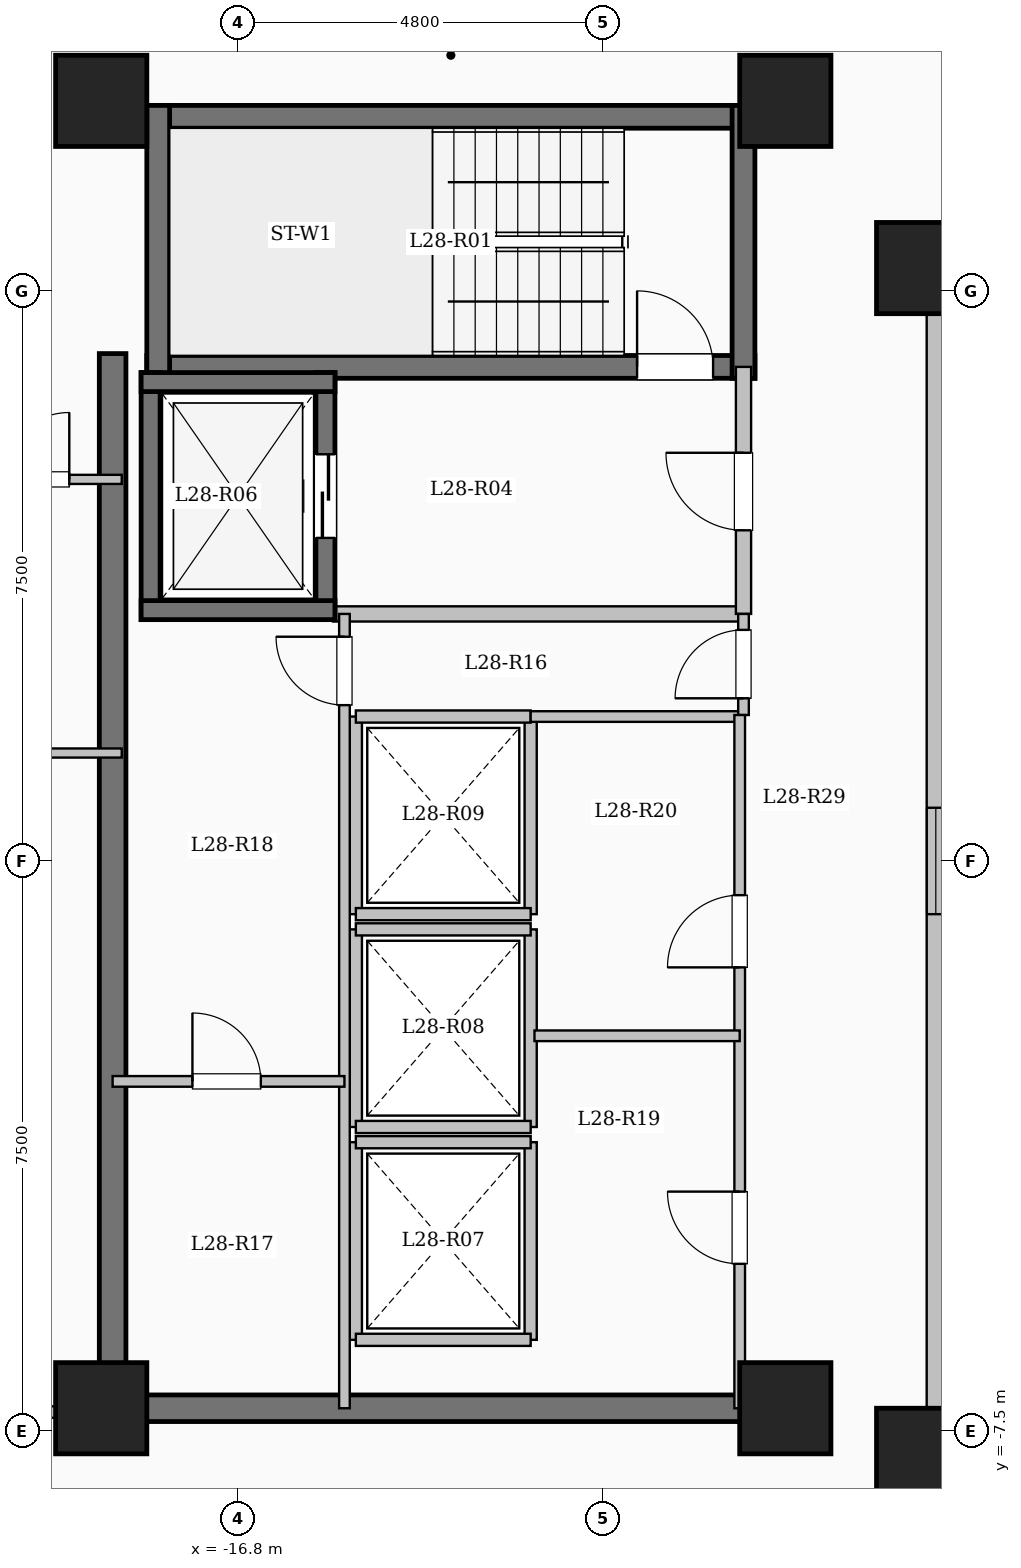
"""IFC4 building model, lengths in metres.
Left out: names, types, materials, properties, quantities, classifications, styles, units other than length and angle.
Written with IfcOpenShell. Run it as: python <this file> out.ifc"""

import sys

from ifc_helpers import new_model, si_unit, direction, frame, frame_2d, origin, origin_2d, place, context, subcontext, project, spatial, rectangle, extrude, element, fill, save


model = new_model("IFC4")
c1 = context("Model", 3, precision=1e-05, world=origin(), true_north=direction((0.0, 1.0)))
c2 = subcontext(c1, "Body", "Model", "MODEL_VIEW")
j1 = project(units=[si_unit("LENGTHUNIT", "METRE"), si_unit("PLANEANGLEUNIT", "RADIAN")], contexts=[c1])
p1 = place(None, origin())
s1 = spatial("IfcSite", under=j1, at=p1, CompositionType="ELEMENT")
p2 = place(p1, origin())
s2 = spatial("IfcBuilding", under=s1, at=p2, CompositionType="ELEMENT")
p3 = place(p2, frame((0.0, 0.0, 105.1)))
s3 = spatial("IfcBuildingStorey", under=s2, at=p3, CompositionType="ELEMENT", Elevation=105.1)
for number, where, z_axis, x_axis in (
    (1, (-7.8, -7.8, 0.0), (0.0, 0.0, 1.0), (1.0, 0.0, 0.0)),
    (2, (-7.8, 7.8, 0.0), (0.0, 0.0, 1.0), (1.0, 0.0, 0.0)),
    (3, (-9.6, -7.2, 0.0), (0.0, 0.0, 1.0), (1.0, 0.0, 0.0)),
    (4, (-9.6, 10.0, 0.0), (0.0, 0.0, 1.0), (1.0, 0.0, 0.0)),
    (5, (-18.6, -7.2, 0.0), (0.0, 0.0, 1.0), (1.0, 0.0, 0.0)),
    (6, (-18.6, 10.0, 0.0), (0.0, 0.0, 1.0), (1.0, 0.0, 0.0)),
):
    element("IfcColumn", number, at=place(p3, frame(where, z_axis=z_axis, x_axis=x_axis)), inside=s3, PredefinedType="COLUMN", context=c2, shape_type="SweptSolid", body=[
        extrude(rectangle(XDim=1.2, YDim=1.2, at=origin_2d()), origin(), (0.0, 0.0, 1.0), 3.35),
    ])
p4 = place(p3, frame((-7.62, -7.62, 0.0), z_axis=(0.0, 0.0, 1.0), x_axis=(1.0, 0.0, 0.0)))
e7 = element("IfcWall", 7, at=p4, inside=s3, PredefinedType="SOLIDWALL", context=c2, shape_type="SweptSolid", body=[
    extrude(rectangle(XDim=15.24, YDim=0.24, at=frame_2d((7.62, 0.0))), origin(), (0.0, 0.0, 1.0), 3.1),
])
p5 = place(p4, frame((6.92, 0.0, 0.95)))
e8 = element("IfcOpeningElement", 8, at=p5, cuts=e7, PredefinedType="OPENING", context=c2, shape_type="SweptSolid", body=[
    extrude(rectangle(XDim=1.4, YDim=1.5, at=frame_2d((0.7, 0.75))), frame((0.0, 0.13, 0.0), z_axis=(0.0, -1.0, 0.0), x_axis=(1.0, 0.0, 0.0)), (0.0, 0.0, 1.0), 0.26),
])
p6 = place(p3, frame((7.62, 7.62, 0.0), z_axis=(0.0, 0.0, 1.0), x_axis=(-1.0, 0.0, 0.0)))
e9 = element("IfcWall", 9, at=p6, inside=s3, PredefinedType="SOLIDWALL", context=c2, shape_type="SweptSolid", body=[
    extrude(rectangle(XDim=15.24, YDim=0.24, at=frame_2d((7.62, 0.0))), origin(), (0.0, 0.0, 1.0), 3.1),
])
p7 = place(p6, frame((6.92, 0.0, 0.95)))
e10 = element("IfcOpeningElement", 10, at=p7, cuts=e9, PredefinedType="OPENING", context=c2, shape_type="SweptSolid", body=[
    extrude(rectangle(XDim=1.4, YDim=1.5, at=frame_2d((0.7, 0.75))), frame((0.0, 0.13, 0.0), z_axis=(0.0, -1.0, 0.0), x_axis=(1.0, 0.0, 0.0)), (0.0, 0.0, 1.0), 0.26),
])
p8 = place(p3, frame((-7.62, 7.62, 0.0), z_axis=(0.0, 0.0, 1.0), x_axis=(0.0, -1.0, 0.0)))
e11 = element("IfcWall", 11, at=p8, inside=s3, PredefinedType="SOLIDWALL", context=c2, shape_type="SweptSolid", body=[
    extrude(rectangle(XDim=15.24, YDim=0.24, at=frame_2d((7.62, 0.0))), origin(), (0.0, 0.0, 1.0), 3.1),
])
p9 = place(p8, frame((6.92, 0.0, 0.95)))
e12 = element("IfcOpeningElement", 12, at=p9, cuts=e11, PredefinedType="OPENING", context=c2, shape_type="SweptSolid", body=[
    extrude(rectangle(XDim=1.4, YDim=1.5, at=frame_2d((0.7, 0.75))), frame((0.0, 0.13, 0.0), z_axis=(0.0, -1.0, 0.0), x_axis=(1.0, 0.0, 0.0)), (0.0, 0.0, 1.0), 0.26),
])
p10 = place(p3, frame((-18.0, 9.79, 0.0), z_axis=(0.0, 0.0, 1.0), x_axis=(1.0, 0.0, 0.0)))
e13 = element("IfcWall", 13, at=p10, inside=s3, PredefinedType="SHEAR", context=c2, shape_type="SweptSolid", body=[
    extrude(rectangle(XDim=8.0, YDim=0.3, at=frame_2d((4.0, 0.0))), origin(), (0.0, 0.0, 1.0), 3.35),
])
p11 = place(p3, frame((-18.0, 6.5, 0.0), z_axis=(0.0, 0.0, 1.0), x_axis=(1.0, 0.0, 0.0)))
e14 = element("IfcWall", 14, at=p11, inside=s3, PredefinedType="SHEAR", context=c2, shape_type="SweptSolid", body=[
    extrude(rectangle(XDim=8.0, YDim=0.3, at=frame_2d((4.0, 0.0))), origin(), (0.0, 0.0, 1.0), 3.35),
])
p12 = place(p11, frame((6.45, 0.0, 0.0)))
e15 = element("IfcOpeningElement", 15, at=p12, cuts=e14, PredefinedType="OPENING", context=c2, shape_type="SweptSolid", body=[
    extrude(rectangle(XDim=1.0, YDim=2.15, at=frame_2d((0.5, 1.075))), frame((0.0, 0.16, 0.0), z_axis=(0.0, -1.0, 0.0), x_axis=(1.0, 0.0, 0.0)), (0.0, 0.0, 1.0), 0.32),
])
for number, where, z_axis, x_axis in (
    (16, (-17.85, 6.35, 0.0), (0.0, 0.0, 1.0), (0.0, 1.0, 0.0)),
    (17, (-10.15, 6.35, 0.0), (0.0, 0.0, 1.0), (0.0, 1.0, 0.0)),
):
    element("IfcWall", number, at=place(p3, frame(where, z_axis=z_axis, x_axis=x_axis)), inside=s3, PredefinedType="SHEAR", context=c2, shape_type="SweptSolid", body=[
        extrude(rectangle(XDim=3.59, YDim=0.3, at=frame_2d((1.795, 0.0))), origin(), (0.0, 0.0, 1.0), 3.35),
    ])
p13 = place(p3, frame((-15.55, 3.25, 0.0), z_axis=(0.0, 0.0, 1.0), x_axis=(1.0, 0.0, 0.0)))
e18 = element("IfcWall", 18, at=p13, inside=s3, PredefinedType="SOLIDWALL", context=c2, shape_type="SweptSolid", body=[
    extrude(rectangle(XDim=5.4, YDim=0.2, at=frame_2d((2.7, 0.0))), origin(), (0.0, 0.0, 1.0), 3.1),
])
p14 = place(p3, frame((-10.15, 3.25, 0.0), z_axis=(0.0, 0.0, 1.0), x_axis=(0.0, 1.0, 0.0)))
e19 = element("IfcWall", 19, at=p14, inside=s3, PredefinedType="SOLIDWALL", context=c2, shape_type="SweptSolid", body=[
    extrude(rectangle(XDim=3.25, YDim=0.2, at=frame_2d((1.625, 0.0))), origin(), (0.0, 0.0, 1.0), 3.1),
])
p15 = place(p14, frame((1.1, 0.0, 0.0)))
e20 = element("IfcOpeningElement", 20, at=p15, cuts=e19, PredefinedType="OPENING", context=c2, shape_type="SweptSolid", body=[
    extrude(rectangle(XDim=1.02, YDim=2.15, at=frame_2d((0.51, 1.075))), frame((0.0, 0.11, 0.0), z_axis=(0.0, -1.0, 0.0), x_axis=(1.0, 0.0, 0.0)), (0.0, 0.0, 1.0), 0.22),
])
p16 = place(p3, frame((-17.95, 3.175, 0.0), z_axis=(0.0, 0.0, 1.0), x_axis=(0.0, 1.0, 0.0)))
e21 = element("IfcWall", 21, at=p16, inside=s3, PredefinedType="SHEAR", context=c2, shape_type="SweptSolid", body=[
    extrude(rectangle(XDim=3.25, YDim=0.25, at=frame_2d((1.625, 0.0))), origin(), (0.0, 0.0, 1.0), 3.35),
])
p17 = place(p3, frame((-15.65, 3.175, 0.0), z_axis=(0.0, 0.0, 1.0), x_axis=(0.0, 1.0, 0.0)))
e22 = element("IfcWall", 22, at=p17, inside=s3, PredefinedType="SHEAR", context=c2, shape_type="SweptSolid", body=[
    extrude(rectangle(XDim=3.25, YDim=0.25, at=frame_2d((1.625, 0.0))), origin(), (0.0, 0.0, 1.0), 3.35),
])
p18 = place(p17, frame((1.075, 0.0, 0.0)))
e23 = element("IfcOpeningElement", 23, at=p18, cuts=e22, PredefinedType="OPENING", context=c2, shape_type="SweptSolid", body=[
    extrude(rectangle(XDim=1.1, YDim=2.15, at=frame_2d((0.55, 1.075))), frame((0.0, 0.135, 0.0), z_axis=(0.0, -1.0, 0.0), x_axis=(1.0, 0.0, 0.0)), (0.0, 0.0, 1.0), 0.27),
])
for number, where, z_axis, x_axis in (
    (24, (-18.075, 3.3, 0.0), (0.0, 0.0, 1.0), (1.0, 0.0, 0.0)),
    (25, (-18.075, 6.3, 0.0), (0.0, 0.0, 1.0), (1.0, 0.0, 0.0)),
):
    element("IfcWall", number, at=place(p3, frame(where, z_axis=z_axis, x_axis=x_axis)), inside=s3, PredefinedType="SHEAR", context=c2, shape_type="SweptSolid", body=[
        extrude(rectangle(XDim=2.55, YDim=0.25, at=frame_2d((1.275, 0.0))), origin(), (0.0, 0.0, 1.0), 3.35),
    ])
for number, where, z_axis, x_axis in (
    (26, (-15.25, -6.3, 0.0), (0.0, 0.0, 1.0), (0.0, 1.0, 0.0)),
    (27, (-12.95, -6.3, 0.0), (0.0, 0.0, 1.0), (0.0, 1.0, 0.0)),
):
    element("IfcWall", number, at=place(p3, frame(where, z_axis=z_axis, x_axis=x_axis)), inside=s3, PredefinedType="SOLIDWALL", context=c2, shape_type="SweptSolid", body=[
        extrude(rectangle(XDim=2.6, YDim=0.16, at=frame_2d((1.3, 0.0))), origin(), (0.0, 0.0, 1.0), 3.1),
    ])
for number, where, z_axis, x_axis in (
    (28, (-15.25, -6.3, 0.0), (0.0, 0.0, 1.0), (1.0, 0.0, 0.0)),
    (29, (-15.25, -3.7, 0.0), (0.0, 0.0, 1.0), (1.0, 0.0, 0.0)),
):
    element("IfcWall", number, at=place(p3, frame(where, z_axis=z_axis, x_axis=x_axis)), inside=s3, PredefinedType="SOLIDWALL", context=c2, shape_type="SweptSolid", body=[
        extrude(rectangle(XDim=2.3, YDim=0.16, at=frame_2d((1.15, 0.0))), origin(), (0.0, 0.0, 1.0), 3.1),
    ])
for number, where, z_axis, x_axis in (
    (30, (-15.25, -3.5, 0.0), (0.0, 0.0, 1.0), (0.0, 1.0, 0.0)),
    (31, (-12.95, -3.5, 0.0), (0.0, 0.0, 1.0), (0.0, 1.0, 0.0)),
):
    element("IfcWall", number, at=place(p3, frame(where, z_axis=z_axis, x_axis=x_axis)), inside=s3, PredefinedType="SOLIDWALL", context=c2, shape_type="SweptSolid", body=[
        extrude(rectangle(XDim=2.6, YDim=0.16, at=frame_2d((1.3, 0.0))), origin(), (0.0, 0.0, 1.0), 3.1),
    ])
for number, where, z_axis, x_axis in (
    (32, (-15.25, -3.5, 0.0), (0.0, 0.0, 1.0), (1.0, 0.0, 0.0)),
    (33, (-15.25, -0.9, 0.0), (0.0, 0.0, 1.0), (1.0, 0.0, 0.0)),
):
    element("IfcWall", number, at=place(p3, frame(where, z_axis=z_axis, x_axis=x_axis)), inside=s3, PredefinedType="SOLIDWALL", context=c2, shape_type="SweptSolid", body=[
        extrude(rectangle(XDim=2.3, YDim=0.16, at=frame_2d((1.15, 0.0))), origin(), (0.0, 0.0, 1.0), 3.1),
    ])
for number, where, z_axis, x_axis in (
    (34, (-15.25, -0.7, 0.0), (0.0, 0.0, 1.0), (0.0, 1.0, 0.0)),
    (35, (-12.95, -0.7, 0.0), (0.0, 0.0, 1.0), (0.0, 1.0, 0.0)),
):
    element("IfcWall", number, at=place(p3, frame(where, z_axis=z_axis, x_axis=x_axis)), inside=s3, PredefinedType="SOLIDWALL", context=c2, shape_type="SweptSolid", body=[
        extrude(rectangle(XDim=2.6, YDim=0.16, at=frame_2d((1.3, 0.0))), origin(), (0.0, 0.0, 1.0), 3.1),
    ])
for number, where, z_axis, x_axis in (
    (36, (-15.25, -0.7, 0.0), (0.0, 0.0, 1.0), (1.0, 0.0, 0.0)),
    (37, (-15.25, 1.9, 0.0), (0.0, 0.0, 1.0), (1.0, 0.0, 0.0)),
):
    element("IfcWall", number, at=place(p3, frame(where, z_axis=z_axis, x_axis=x_axis)), inside=s3, PredefinedType="SOLIDWALL", context=c2, shape_type="SweptSolid", body=[
        extrude(rectangle(XDim=2.3, YDim=0.16, at=frame_2d((1.15, 0.0))), origin(), (0.0, 0.0, 1.0), 3.1),
    ])
p19 = place(p3, frame((-18.45, -7.375, 0.0), z_axis=(0.0, 0.0, 1.0), x_axis=(0.0, 1.0, 0.0)))
e38 = element("IfcWall", 38, at=p19, inside=s3, PredefinedType="SHEAR", context=c2, shape_type="SweptSolid", body=[
    extrude(rectangle(XDim=14.05, YDim=0.35, at=frame_2d((7.025, 0.0))), origin(), (0.0, 0.0, 1.0), 3.35),
])
p20 = place(p3, frame((-18.625, -7.2, 0.0), z_axis=(0.0, 0.0, 1.0), x_axis=(1.0, 0.0, 0.0)))
e39 = element("IfcWall", 39, at=p20, inside=s3, PredefinedType="SHEAR", context=c2, shape_type="SweptSolid", body=[
    extrude(rectangle(XDim=8.55, YDim=0.35, at=frame_2d((4.275, 0.0))), origin(), (0.0, 0.0, 1.0), 3.35),
])
p21 = place(p3, frame((-12.95, 1.9, 0.0), z_axis=(0.0, 0.0, 1.0), x_axis=(1.0, 0.0, 0.0)))
e40 = element("IfcWall", 40, at=p21, inside=s3, PredefinedType="PARTITIONING", context=c2, shape_type="SweptSolid", body=[
    extrude(rectangle(XDim=2.8, YDim=0.14, at=frame_2d((1.4, 0.0))), origin(), (0.0, 0.0, 1.0), 3.1),
])
p22 = place(p3, frame((-10.15, 1.92, 0.0), z_axis=(0.0, 0.0, 1.0), x_axis=(0.0, 1.0, 0.0)))
e41 = element("IfcWall", 41, at=p22, inside=s3, PredefinedType="PARTITIONING", context=c2, shape_type="SweptSolid", body=[
    extrude(rectangle(XDim=1.33, YDim=0.14, at=frame_2d((0.665, 0.0))), origin(), (0.0, 0.0, 1.0), 3.1),
])
p23 = place(p22, frame((0.22, 0.0, 0.0)))
e42 = element("IfcOpeningElement", 42, at=p23, cuts=e41, PredefinedType="OPENING", context=c2, shape_type="SweptSolid", body=[
    extrude(rectangle(XDim=0.9, YDim=2.08, at=frame_2d((0.45, 1.04))), frame((0.0, 0.08, 0.0), z_axis=(0.0, -1.0, 0.0), x_axis=(1.0, 0.0, 0.0)), (0.0, 0.0, 1.0), 0.16),
])
p24 = place(p3, frame((-15.4, -7.2, 0.0), z_axis=(0.0, 0.0, 1.0), x_axis=(0.0, 1.0, 0.0)))
e43 = element("IfcWall", 43, at=p24, inside=s3, PredefinedType="PARTITIONING", context=c2, shape_type="SweptSolid", body=[
    extrude(rectangle(XDim=10.45, YDim=0.14, at=frame_2d((5.225, 0.0))), origin(), (0.0, 0.0, 1.0), 3.1),
])
p25 = place(p24, frame((9.25, 0.0, 0.0)))
e44 = element("IfcOpeningElement", 44, at=p25, cuts=e43, PredefinedType="OPENING", context=c2, shape_type="SweptSolid", body=[
    extrude(rectangle(XDim=0.9, YDim=2.08, at=frame_2d((0.45, 1.04))), frame((0.0, 0.08, 0.0), z_axis=(0.0, -1.0, 0.0), x_axis=(1.0, 0.0, 0.0)), (0.0, 0.0, 1.0), 0.16),
])
p26 = place(p3, frame((-18.45, -2.9, 0.0), z_axis=(0.0, 0.0, 1.0), x_axis=(1.0, 0.0, 0.0)))
e45 = element("IfcWall", 45, at=p26, inside=s3, PredefinedType="PARTITIONING", context=c2, shape_type="SweptSolid", body=[
    extrude(rectangle(XDim=3.05, YDim=0.14, at=frame_2d((1.525, 0.0))), origin(), (0.0, 0.0, 1.0), 3.1),
])
p27 = place(p26, frame((1.05, 0.0, 0.0)))
e46 = element("IfcOpeningElement", 46, at=p27, cuts=e45, PredefinedType="OPENING", context=c2, shape_type="SweptSolid", body=[
    extrude(rectangle(XDim=0.9, YDim=2.08, at=frame_2d((0.45, 1.04))), frame((0.0, 0.08, 0.0), z_axis=(0.0, -1.0, 0.0), x_axis=(1.0, 0.0, 0.0)), (0.0, 0.0, 1.0), 0.16),
])
p28 = place(p3, frame((-10.2, -7.2, 0.0), z_axis=(0.0, 0.0, 1.0), x_axis=(0.0, 1.0, 0.0)))
e47 = element("IfcWall", 47, at=p28, inside=s3, PredefinedType="PARTITIONING", context=c2, shape_type="SweptSolid", body=[
    extrude(rectangle(XDim=9.12, YDim=0.14, at=frame_2d((4.56, 0.0))), origin(), (0.0, 0.0, 1.0), 3.1),
])
p29 = place(p28, frame((1.9, 0.0, 0.0)))
e48 = element("IfcOpeningElement", 48, at=p29, cuts=e47, PredefinedType="OPENING", context=c2, shape_type="SweptSolid", body=[
    extrude(rectangle(XDim=0.95, YDim=2.12, at=frame_2d((0.475, 1.06))), frame((0.0, 0.08, 0.0), z_axis=(0.0, -1.0, 0.0), x_axis=(1.0, 0.0, 0.0)), (0.0, 0.0, 1.0), 0.16),
])
p30 = place(p28, frame((5.8, 0.0, 0.0)))
e49 = element("IfcOpeningElement", 49, at=p30, cuts=e47, PredefinedType="OPENING", context=c2, shape_type="SweptSolid", body=[
    extrude(rectangle(XDim=0.95, YDim=2.12, at=frame_2d((0.475, 1.06))), frame((0.0, 0.08, 0.0), z_axis=(0.0, -1.0, 0.0), x_axis=(1.0, 0.0, 0.0)), (0.0, 0.0, 1.0), 0.16),
])
p31 = place(p3, frame((-12.9, -2.3, 0.0), z_axis=(0.0, 0.0, 1.0), x_axis=(1.0, 0.0, 0.0)))
e50 = element("IfcWall", 50, at=p31, inside=s3, PredefinedType="PARTITIONING", context=c2, shape_type="SweptSolid", body=[
    extrude(rectangle(XDim=2.7, YDim=0.14, at=frame_2d((1.35, 0.0))), origin(), (0.0, 0.0, 1.0), 3.1),
])
p32 = place(p3, frame((-26.88, -7.25, 0.0), z_axis=(0.0, 0.0, 1.0), x_axis=(1.0, 0.0, 0.0)))
e51 = element("IfcWall", 51, at=p32, inside=s3, PredefinedType="PARTITIONING", context=c2, shape_type="SweptSolid", body=[
    extrude(rectangle(XDim=8.43, YDim=0.15, at=frame_2d((4.215, 0.0))), origin(), (0.0, 0.0, 1.0), 3.1),
])
p33 = place(p32, frame((5.33, 0.0, 0.0)))
e52 = element("IfcOpeningElement", 52, at=p33, cuts=e51, PredefinedType="OPENING", context=c2, shape_type="SweptSolid", body=[
    extrude(rectangle(XDim=0.96, YDim=2.15, at=frame_2d((0.48, 1.075))), frame((0.0, 0.085, 0.0), z_axis=(0.0, -1.0, 0.0), x_axis=(1.0, 0.0, 0.0)), (0.0, 0.0, 1.0), 0.17),
])
p34 = place(p3, frame((-27.0, 1.42, 0.0), z_axis=(0.0, 0.0, 1.0), x_axis=(1.0, 0.0, 0.0)))
e53 = element("IfcWall", 53, at=p34, inside=s3, PredefinedType="PARTITIONING", context=c2, shape_type="SweptSolid", body=[
    extrude(rectangle(XDim=8.67, YDim=0.12, at=frame_2d((4.335, 0.0))), origin(), (0.0, 0.0, 1.0), 3.1),
])
p35 = place(p34, frame((1.763, 0.0, 0.0)))
e54 = element("IfcOpeningElement", 54, at=p35, cuts=e53, PredefinedType="OPENING", context=c2, shape_type="SweptSolid", body=[
    extrude(rectangle(XDim=0.88, YDim=2.1, at=frame_2d((0.44, 1.05))), frame((0.0, 0.07, 0.0), z_axis=(0.0, -1.0, 0.0), x_axis=(1.0, 0.0, 0.0)), (0.0, 0.0, 1.0), 0.14),
])
p36 = place(p34, frame((5.928, 0.0, 0.0)))
e55 = element("IfcOpeningElement", 55, at=p36, cuts=e53, PredefinedType="OPENING", context=c2, shape_type="SweptSolid", body=[
    extrude(rectangle(XDim=0.88, YDim=2.1, at=frame_2d((0.44, 1.05))), frame((0.0, 0.07, 0.0), z_axis=(0.0, -1.0, 0.0), x_axis=(1.0, 0.0, 0.0)), (0.0, 0.0, 1.0), 0.14),
])
p37 = place(p3, frame((-27.0, 5.02, 0.0), z_axis=(0.0, 0.0, 1.0), x_axis=(1.0, 0.0, 0.0)))
e56 = element("IfcWall", 56, at=p37, inside=s3, PredefinedType="PARTITIONING", context=c2, shape_type="SweptSolid", body=[
    extrude(rectangle(XDim=8.67, YDim=0.12, at=frame_2d((4.335, 0.0))), origin(), (0.0, 0.0, 1.0), 3.1),
])
p38 = place(p37, frame((7.1, 0.0, 0.0)))
e57 = element("IfcOpeningElement", 57, at=p38, cuts=e56, PredefinedType="OPENING", context=c2, shape_type="SweptSolid", body=[
    extrude(rectangle(XDim=0.88, YDim=2.1, at=frame_2d((0.44, 1.05))), frame((0.0, 0.07, 0.0), z_axis=(0.0, -1.0, 0.0), x_axis=(1.0, 0.0, 0.0)), (0.0, 0.0, 1.0), 0.14),
])
p39 = place(p9, origin())
e58 = element("IfcWindow", 58, at=p39, inside=s3, PartitioningType="SINGLE_PANEL", PredefinedType="WINDOW", context=c2, shape_type="SweptSolid", body=[
    extrude(rectangle(XDim=1.4, YDim=1.5, at=frame_2d((0.7, 0.75))), frame((0.0, 0.03, 0.0), z_axis=(0.0, -1.0, 0.0), x_axis=(1.0, 0.0, 0.0)), (0.0, 0.0, 1.0), 0.06),
])
fill(e12, e58)
p40 = place(p12, origin())
e59 = element("IfcDoor", 59, at=p40, inside=s3, OperationType="SINGLE_SWING_LEFT", PredefinedType="DOOR", context=c2, shape_type="SweptSolid", body=[
    extrude(rectangle(XDim=1.0, YDim=2.15, at=frame_2d((0.5, 1.075))), frame((0.0, 0.025, 0.0), z_axis=(0.0, -1.0, 0.0), x_axis=(1.0, 0.0, 0.0)), (0.0, 0.0, 1.0), 0.05),
])
fill(e15, e59)
p41 = place(p15, origin())
e60 = element("IfcDoor", 60, at=p41, inside=s3, OperationType="SINGLE_SWING_RIGHT", PredefinedType="DOOR", context=c2, shape_type="SweptSolid", body=[
    extrude(rectangle(XDim=1.02, YDim=2.15, at=frame_2d((0.51, 1.075))), frame((0.0, 0.025, 0.0), z_axis=(0.0, -1.0, 0.0), x_axis=(1.0, 0.0, 0.0)), (0.0, 0.0, 1.0), 0.05),
])
fill(e20, e60)
p42 = place(p18, origin())
e61 = element("IfcDoor", 61, at=p42, inside=s3, OperationType="SLIDING_TO_LEFT", PredefinedType="DOOR", context=c2, shape_type="SweptSolid", body=[
    extrude(rectangle(XDim=1.1, YDim=2.15, at=frame_2d((0.55, 1.075))), frame((0.0, 0.025, 0.0), z_axis=(0.0, -1.0, 0.0), x_axis=(1.0, 0.0, 0.0)), (0.0, 0.0, 1.0), 0.05),
])
fill(e23, e61)
p43 = place(p23, origin())
e62 = element("IfcDoor", 62, at=p43, inside=s3, OperationType="SINGLE_SWING_LEFT", PredefinedType="DOOR", context=c2, shape_type="SweptSolid", body=[
    extrude(rectangle(XDim=0.9, YDim=2.08, at=frame_2d((0.45, 1.04))), frame((0.0, 0.025, 0.0), z_axis=(0.0, -1.0, 0.0), x_axis=(1.0, 0.0, 0.0)), (0.0, 0.0, 1.0), 0.05),
])
fill(e42, e62)
p44 = place(p25, origin())
e63 = element("IfcDoor", 63, at=p44, inside=s3, OperationType="SINGLE_SWING_RIGHT", PredefinedType="DOOR", context=c2, shape_type="SweptSolid", body=[
    extrude(rectangle(XDim=0.9, YDim=2.08, at=frame_2d((0.45, 1.04))), frame((0.0, 0.025, 0.0), z_axis=(0.0, -1.0, 0.0), x_axis=(1.0, 0.0, 0.0)), (0.0, 0.0, 1.0), 0.05),
])
fill(e44, e63)
p45 = place(p27, origin())
e64 = element("IfcDoor", 64, at=p45, inside=s3, OperationType="SINGLE_SWING_LEFT", PredefinedType="DOOR", context=c2, shape_type="SweptSolid", body=[
    extrude(rectangle(XDim=0.9, YDim=2.08, at=frame_2d((0.45, 1.04))), frame((0.0, 0.025, 0.0), z_axis=(0.0, -1.0, 0.0), x_axis=(1.0, 0.0, 0.0)), (0.0, 0.0, 1.0), 0.05),
])
fill(e46, e64)
p46 = place(p29, origin())
e65 = element("IfcDoor", 65, at=p46, inside=s3, OperationType="SINGLE_SWING_RIGHT", PredefinedType="DOOR", context=c2, shape_type="SweptSolid", body=[
    extrude(rectangle(XDim=0.95, YDim=2.12, at=frame_2d((0.475, 1.06))), frame((0.0, 0.025, 0.0), z_axis=(0.0, -1.0, 0.0), x_axis=(1.0, 0.0, 0.0)), (0.0, 0.0, 1.0), 0.05),
])
fill(e48, e65)
p47 = place(p30, origin())
e66 = element("IfcDoor", 66, at=p47, inside=s3, OperationType="SINGLE_SWING_LEFT", PredefinedType="DOOR", context=c2, shape_type="SweptSolid", body=[
    extrude(rectangle(XDim=0.95, YDim=2.12, at=frame_2d((0.475, 1.06))), frame((0.0, 0.025, 0.0), z_axis=(0.0, -1.0, 0.0), x_axis=(1.0, 0.0, 0.0)), (0.0, 0.0, 1.0), 0.05),
])
fill(e49, e66)
p48 = place(p38, origin())
e67 = element("IfcDoor", 67, at=p48, inside=s3, OperationType="SINGLE_SWING_RIGHT", PredefinedType="DOOR", context=c2, shape_type="SweptSolid", body=[
    extrude(rectangle(XDim=0.88, YDim=2.1, at=frame_2d((0.44, 1.05))), frame((0.0, 0.025, 0.0), z_axis=(0.0, -1.0, 0.0), x_axis=(1.0, 0.0, 0.0)), (0.0, 0.0, 1.0), 0.05),
])
fill(e57, e67)
save(model, sys.argv[1])
